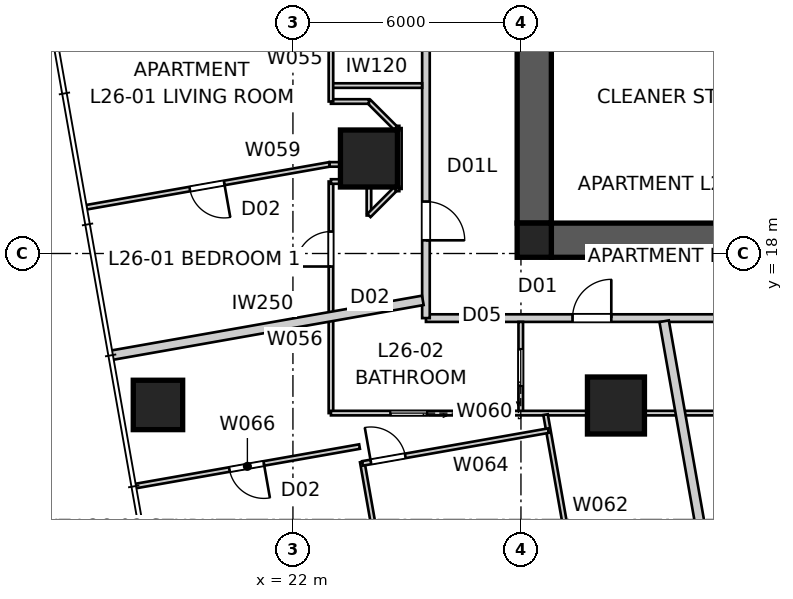
"""IFC4 building model, lengths in metres.
Left out: names, types, materials, properties, quantities, classifications, styles, units other than length and angle.
Written with IfcOpenShell. Run it as: python <this file> out.ifc"""

import sys

from ifc_helpers import new_model, si_unit, direction, frame, frame_2d, origin, origin_2d, place, context, subcontext, project, spatial, polyline, rectangle, outline, extrude, element, fill, save


model = new_model("IFC4")
c1 = context("Model", 3, precision=1e-05, world=origin(), true_north=direction((0.0, 1.0)))
c2 = subcontext(c1, "Body", "Model", "MODEL_VIEW")
j1 = project(units=[si_unit("LENGTHUNIT", "METRE"), si_unit("PLANEANGLEUNIT", "RADIAN")], contexts=[c1])
p1 = place(None, origin())
s1 = spatial("IfcSite", under=j1, at=p1, CompositionType="ELEMENT")
p2 = place(p1, origin())
s2 = spatial("IfcBuilding", under=s1, at=p2, CompositionType="ELEMENT")
p3 = place(p2, frame((0.0, 0.0, 96.4)))
s3 = spatial("IfcBuildingStorey", under=s2, at=p3, CompositionType="ELEMENT", Elevation=96.4)
p4 = place(p3, frame((51.2, 18.35, 0.0), z_axis=(0.0, 0.0, 1.0), x_axis=(-1.0, 0.0, 0.0)))
e1 = element("IfcWall", 1, at=p4, inside=s3, PredefinedType="SHEAR", context=c2, shape_type="SweptSolid", body=[
    extrude(outline(polyline([(0.0, -0.45), (22.4, -0.45), (22.4, -0.025), (22.85, -0.025), (22.85, 0.025), (22.4, 0.025), (22.4, 0.45), (0.0, 0.45), (0.0, 0.025), (-0.45, 0.025), (-0.45, -0.025), (0.0, -0.025), (0.0, -0.45)])), origin(), (0.0, 0.0, 1.0), 3.4),
])
p5 = place(p3, frame((28.35, 41.2, 0.0), z_axis=(0.0, 0.0, 1.0), x_axis=(0.0, -1.0, 0.0)))
e2 = element("IfcWall", 2, at=p5, inside=s3, PredefinedType="SHEAR", context=c2, shape_type="SweptSolid", body=[
    extrude(outline(polyline([(0.0, -0.45), (22.4, -0.45), (22.4, -0.025), (22.85, -0.025), (22.85, 0.025), (22.4, 0.025), (22.4, 0.45), (0.0, 0.45), (0.0, 0.025), (-0.45, 0.025), (-0.45, -0.025), (0.0, -0.025), (0.0, -0.45)])), origin(), (0.0, 0.0, 1.0), 3.4),
])
p6 = place(p5, frame((11.14, 0.0, 0.0)))
e3 = element("IfcOpeningElement", 3, at=p6, cuts=e2, PredefinedType="OPENING", context=c2, shape_type="SweptSolid", body=[
    extrude(rectangle(XDim=1.02, YDim=2.4, at=frame_2d((0.51, 1.2))), frame((0.0, 0.46, 0.0), z_axis=(0.0, -1.0, 0.0), x_axis=(1.0, 0.0, 0.0)), (0.0, 0.0, 1.0), 0.92),
])
p7 = place(p3, frame((28.35, 18.35, 0.0), z_axis=(0.0, 0.0, 1.0), x_axis=(1.0, 0.0, 0.0)))
e4 = element("IfcColumn", 4, at=p7, inside=s3, PredefinedType="COLUMN", context=c2, shape_type="SweptSolid", body=[
    extrude(rectangle(XDim=0.9, YDim=0.9, at=origin_2d()), origin(), (0.0, 0.0, 1.0), 3.4),
])
p8 = place(p3, frame((18.448, 14.015, 0.0), z_axis=(0.0, 0.0, 1.0), x_axis=(1.0, 0.0, 0.0)))
e5 = element("IfcColumn", 5, at=p8, inside=s3, PredefinedType="COLUMN", context=c2, shape_type="SweptSolid", body=[
    extrude(rectangle(XDim=1.3, YDim=1.3, at=origin_2d()), origin(), (0.0, 0.0, 1.0), 3.4),
])
for number, where, z_axis, x_axis in (
    (6, (24.0, 20.5, 0.0), (0.0, 0.0, 1.0), (1.0, 0.0, 0.0)),
    (7, (30.5, 14.0, 0.0), (0.0, 0.0, 1.0), (1.0, 0.0, 0.0)),
):
    element("IfcColumn", number, at=place(p3, frame(where, z_axis=z_axis, x_axis=x_axis)), inside=s3, PredefinedType="COLUMN", context=c2, shape_type="SweptSolid", body=[
        extrude(rectangle(XDim=1.5, YDim=1.5, at=origin_2d()), origin(), (0.0, 0.0, 1.0), 3.4),
    ])
p9 = place(p3, frame((25.5, 16.3, 0.0), z_axis=(0.0, 0.0, 1.0), x_axis=(1.0, 0.0, 0.0)))
e8 = element("IfcWall", 8, at=p9, inside=s3, PredefinedType="PARTITIONING", context=c2, shape_type="SweptSolid", body=[
    extrude(rectangle(XDim=29.0, YDim=0.2, at=frame_2d((14.5, 0.0))), origin(), (0.0, 0.0, 1.0), 3.25),
])
p10 = place(p9, frame((20.896, 0.0, 0.0)))
e9 = element("IfcOpeningElement", 9, at=p10, cuts=e8, PredefinedType="OPENING", context=c2, shape_type="SweptSolid", body=[
    extrude(rectangle(XDim=1.02, YDim=2.34, at=frame_2d((0.51, 1.17))), frame((0.0, 0.11, 0.0), z_axis=(0.0, -1.0, 0.0), x_axis=(1.0, 0.0, 0.0)), (0.0, 0.0, 1.0), 0.22),
])
p11 = place(p9, frame((14.257, 0.0, 0.0)))
e10 = element("IfcOpeningElement", 10, at=p11, cuts=e8, PredefinedType="OPENING", context=c2, shape_type="SweptSolid", body=[
    extrude(rectangle(XDim=1.02, YDim=2.34, at=frame_2d((0.51, 1.17))), frame((0.0, 0.11, 0.0), z_axis=(0.0, -1.0, 0.0), x_axis=(1.0, 0.0, 0.0)), (0.0, 0.0, 1.0), 0.22),
])
p12 = place(p9, frame((3.857, 0.0, 0.0)))
e11 = element("IfcOpeningElement", 11, at=p12, cuts=e8, PredefinedType="OPENING", context=c2, shape_type="SweptSolid", body=[
    extrude(rectangle(XDim=1.02, YDim=2.34, at=frame_2d((0.51, 1.17))), frame((0.0, 0.11, 0.0), z_axis=(0.0, -1.0, 0.0), x_axis=(1.0, 0.0, 0.0)), (0.0, 0.0, 1.0), 0.22),
])
p13 = place(p3, frame((25.5, 43.7, 0.0), z_axis=(0.0, 0.0, 1.0), x_axis=(0.0, -1.0, 0.0)))
e12 = element("IfcWall", 12, at=p13, inside=s3, PredefinedType="PARTITIONING", context=c2, shape_type="SweptSolid", body=[
    extrude(rectangle(XDim=27.4, YDim=0.2, at=frame_2d((13.7, 0.0))), origin(), (0.0, 0.0, 1.0), 3.25),
])
p14 = place(p13, frame((24.333, 0.0, 0.0)))
e13 = element("IfcOpeningElement", 13, at=p14, cuts=e12, PredefinedType="OPENING", context=c2, shape_type="SweptSolid", body=[
    extrude(rectangle(XDim=1.02, YDim=2.1, at=frame_2d((0.51, 1.05))), frame((0.0, 0.11, 0.0), z_axis=(0.0, -1.0, 0.0), x_axis=(1.0, 0.0, 0.0)), (0.0, 0.0, 1.0), 0.22),
])
p15 = place(p13, frame((10.631, 0.0, 0.0)))
e14 = element("IfcOpeningElement", 14, at=p15, cuts=e12, PredefinedType="OPENING", context=c2, shape_type="SweptSolid", body=[
    extrude(rectangle(XDim=1.02, YDim=2.34, at=frame_2d((0.51, 1.17))), frame((0.0, 0.11, 0.0), z_axis=(0.0, -1.0, 0.0), x_axis=(1.0, 0.0, 0.0)), (0.0, 0.0, 1.0), 0.22),
])
p16 = place(p13, frame((0.911, 0.0, 0.0)))
e15 = element("IfcOpeningElement", 15, at=p16, cuts=e12, PredefinedType="OPENING", context=c2, shape_type="SweptSolid", body=[
    extrude(rectangle(XDim=1.02, YDim=2.34, at=frame_2d((0.51, 1.17))), frame((0.0, 0.11, 0.0), z_axis=(0.0, -1.0, 0.0), x_axis=(1.0, 0.0, 0.0)), (0.0, 0.0, 1.0), 0.22),
])
p17 = place(p3, frame((34.001, 3.556, 0.0), z_axis=(0.0, 0.0, 1.0), x_axis=(-0.173639088111, 0.984809355703, 0.0)))
e16 = element("IfcWall", 16, at=p17, inside=s3, PredefinedType="PARTITIONING", context=c2, shape_type="SweptSolid", body=[
    extrude(rectangle(XDim=12.857, YDim=0.25, at=frame_2d((6.428, 0.0))), origin(), (0.0, 0.0, 1.0), 3.25),
])
p18 = place(p3, frame((17.203, 15.318, 0.0), z_axis=(0.0, 0.0, 1.0), x_axis=(0.984807121942, 0.173651756605, 0.0)))
e17 = element("IfcWall", 17, at=p18, inside=s3, PredefinedType="PARTITIONING", context=c2, shape_type="SweptSolid", body=[
    extrude(rectangle(XDim=8.341, YDim=0.25, at=frame_2d((4.171, 0.0))), origin(), (0.0, 0.0, 1.0), 3.25),
])
p19 = place(p3, frame((23.0, 22.419, 0.0), z_axis=(0.0, 0.0, 1.0), x_axis=(1.0, 0.0, 0.0)))
e18 = element("IfcWall", 18, at=p19, inside=s3, PredefinedType="PARTITIONING", context=c2, shape_type="SweptSolid", body=[
    extrude(rectangle(XDim=2.4, YDim=0.12, at=frame_2d((1.2, 0.0))), origin(), (0.0, 0.0, 1.0), 3.25),
])
p20 = place(p3, frame((24.0, 20.344, 0.0), z_axis=(0.0, 0.0, 1.0), x_axis=(0.0, -1.0, 0.0)))
e19 = element("IfcWall", 19, at=p20, inside=s3, PredefinedType="PARTITIONING", context=c2, shape_type="SweptSolid", body=[
    extrude(rectangle(XDim=1.344, YDim=0.12, at=frame_2d((0.672, 0.0))), origin(), (0.0, 0.0, 1.0), 3.25),
])
p21 = place(p3, frame((24.0, 19.0, 0.0), z_axis=(0.0, 0.0, 1.0), x_axis=(0.707106781187, 0.707106781187, 0.0)))
e20 = element("IfcWall", 20, at=p21, inside=s3, PredefinedType="PARTITIONING", context=c2, shape_type="SweptSolid", body=[
    extrude(rectangle(XDim=0.99, YDim=0.12, at=frame_2d((0.495, 0.0))), origin(), (0.0, 0.0, 1.0), 3.25),
])
p22 = place(p3, frame((24.8, 19.7, 0.0), z_axis=(0.0, 0.0, 1.0), x_axis=(0.0, 1.0, 0.0)))
e21 = element("IfcWall", 21, at=p22, inside=s3, PredefinedType="PARTITIONING", context=c2, shape_type="SweptSolid", body=[
    extrude(rectangle(XDim=1.6, YDim=0.12, at=frame_2d((0.8, 0.0))), origin(), (0.0, 0.0, 1.0), 3.25),
])
p23 = place(p3, frame((24.7, 21.3, 0.0), z_axis=(0.0, 0.0, 1.0), x_axis=(-0.707106781187, 0.707106781187, 0.0)))
e22 = element("IfcWall", 22, at=p23, inside=s3, PredefinedType="PARTITIONING", context=c2, shape_type="SweptSolid", body=[
    extrude(rectangle(XDim=0.99, YDim=0.12, at=frame_2d((0.495, 0.0))), origin(), (0.0, 0.0, 1.0), 3.25),
])
p24 = place(p3, frame((24.0, 22.0, 0.0), z_axis=(0.0, 0.0, 1.0), x_axis=(-1.0, 0.0, 0.0)))
e23 = element("IfcWall", 23, at=p24, inside=s3, PredefinedType="PARTITIONING", context=c2, shape_type="SweptSolid", body=[
    extrude(rectangle(XDim=1.0, YDim=0.12, at=frame_2d((0.5, 0.0))), origin(), (0.0, 0.0, 1.0), 2.722),
])
p25 = place(p3, frame((23.0, 22.0, 0.0), z_axis=(0.0, 0.0, 1.0), x_axis=(0.0, 1.0, 0.0)))
e24 = element("IfcWall", 24, at=p25, inside=s3, PredefinedType="PARTITIONING", context=c2, shape_type="SweptSolid", body=[
    extrude(rectangle(XDim=15.664, YDim=0.12, at=frame_2d((7.832, 0.0))), origin(), (0.0, 0.0, 1.0), 2.55),
])
p26 = place(p25, frame((9.874, 0.0, 0.0)))
e25 = element("IfcOpeningElement", 25, at=p26, cuts=e24, PredefinedType="OPENING", context=c2, shape_type="SweptSolid", body=[
    extrude(rectangle(XDim=0.92, YDim=2.34, at=frame_2d((0.46, 1.17))), frame((0.0, 0.07, 0.0), z_axis=(0.0, -1.0, 0.0), x_axis=(1.0, 0.0, 0.0)), (0.0, 0.0, 1.0), 0.14),
])
p27 = place(p25, frame((13.734, 0.0, 0.0)))
e26 = element("IfcOpeningElement", 26, at=p27, cuts=e24, PredefinedType="OPENING", context=c2, shape_type="SweptSolid", body=[
    extrude(rectangle(XDim=0.96, YDim=2.1, at=frame_2d((0.48, 1.05))), frame((0.0, 0.07, 0.0), z_axis=(0.0, -1.0, 0.0), x_axis=(1.0, 0.0, 0.0)), (0.0, 0.0, 1.0), 0.14),
])
p28 = place(p25, frame((6.198, 0.0, 0.0)))
e27 = element("IfcOpeningElement", 27, at=p28, cuts=e24, PredefinedType="OPENING", context=c2, shape_type="SweptSolid", body=[
    extrude(rectangle(XDim=0.96, YDim=2.1, at=frame_2d((0.48, 1.05))), frame((0.0, 0.07, 0.0), z_axis=(0.0, -1.0, 0.0), x_axis=(1.0, 0.0, 0.0)), (0.0, 0.0, 1.0), 0.14),
])
p29 = place(p25, frame((2.231, 0.0, 0.0)))
e28 = element("IfcOpeningElement", 28, at=p29, cuts=e24, PredefinedType="OPENING", context=c2, shape_type="SweptSolid", body=[
    extrude(rectangle(XDim=0.96, YDim=2.1, at=frame_2d((0.48, 1.05))), frame((0.0, 0.07, 0.0), z_axis=(0.0, -1.0, 0.0), x_axis=(1.0, 0.0, 0.0)), (0.0, 0.0, 1.0), 0.14),
])
p30 = place(p3, frame((23.0, 13.8, 0.0), z_axis=(0.0, 0.0, 1.0), x_axis=(0.0, 1.0, 0.0)))
e29 = element("IfcWall", 29, at=p30, inside=s3, PredefinedType="PARTITIONING", context=c2, shape_type="SweptSolid", body=[
    extrude(rectangle(XDim=6.094, YDim=0.12, at=frame_2d((3.047, 0.0))), origin(), (0.0, 0.0, 1.0), 3.25),
])
p31 = place(p30, frame((3.857, 0.0, 0.0)))
e30 = element("IfcOpeningElement", 30, at=p31, cuts=e29, PredefinedType="OPENING", context=c2, shape_type="SweptSolid", body=[
    extrude(rectangle(XDim=0.92, YDim=2.34, at=frame_2d((0.46, 1.17))), frame((0.0, 0.07, 0.0), z_axis=(0.0, -1.0, 0.0), x_axis=(1.0, 0.0, 0.0)), (0.0, 0.0, 1.0), 0.14),
])
p32 = place(p3, frame((23.0, 19.894, 0.0), z_axis=(0.0, 0.0, 1.0), x_axis=(1.0, 0.0, 0.0)))
e31 = element("IfcWall", 31, at=p32, inside=s3, PredefinedType="PARTITIONING", context=c2, shape_type="SweptSolid", body=[
    extrude(rectangle(XDim=1.0, YDim=0.12, at=frame_2d((0.5, 0.0))), origin(), (0.0, 0.0, 1.0), 3.25),
])
p33 = place(p3, frame((24.0, 20.344, 0.0), z_axis=(0.0, 0.0, 1.0), x_axis=(-1.0, 0.0, 0.0)))
e32 = element("IfcWall", 32, at=p33, inside=s3, PredefinedType="PARTITIONING", context=c2, shape_type="SweptSolid", body=[
    extrude(rectangle(XDim=1.039, YDim=0.12, at=frame_2d((0.52, 0.0))), origin(), (0.0, 0.0, 1.0), 3.25),
])
p34 = place(p3, frame((22.961, 20.344, 0.0), z_axis=(0.0, 0.0, 1.0), x_axis=(-0.984809249117, -0.173639692622, 0.0)))
e33 = element("IfcWall", 33, at=p34, inside=s3, PredefinedType="PARTITIONING", context=c2, shape_type="SweptSolid", body=[
    extrude(rectangle(XDim=6.503, YDim=0.12, at=frame_2d((3.251, 0.0))), origin(), (0.0, 0.0, 1.0), 3.25),
])
p35 = place(p34, frame((2.811, 0.0, 0.0)))
e34 = element("IfcOpeningElement", 34, at=p35, cuts=e33, PredefinedType="OPENING", context=c2, shape_type="SweptSolid", body=[
    extrude(rectangle(XDim=0.92, YDim=2.34, at=frame_2d((0.46, 1.17))), frame((0.0, 0.07, 0.0), z_axis=(0.0, -1.0, 0.0), x_axis=(1.0, 0.0, 0.0)), (0.0, 0.0, 1.0), 0.14),
])
p36 = place(p3, frame((27.995, 13.8, 0.0), z_axis=(0.0, 0.0, 1.0), x_axis=(0.0, 1.0, 0.0)))
e35 = element("IfcWall", 35, at=p36, inside=s3, PredefinedType="PARTITIONING", context=c2, shape_type="SweptSolid", body=[
    extrude(rectangle(XDim=2.4, YDim=0.12, at=frame_2d((1.2, 0.0))), origin(), (0.0, 0.0, 1.0), 3.25),
])
p37 = place(p36, frame((0.72, 0.0, 0.0)))
e36 = element("IfcOpeningElement", 36, at=p37, cuts=e35, PredefinedType="OPENING", context=c2, shape_type="SweptSolid", body=[
    extrude(rectangle(XDim=0.96, YDim=2.1, at=frame_2d((0.48, 1.05))), frame((0.0, 0.07, 0.0), z_axis=(0.0, -1.0, 0.0), x_axis=(1.0, 0.0, 0.0)), (0.0, 0.0, 1.0), 0.14),
])
p38 = place(p3, frame((57.0, 13.8, 0.0), z_axis=(0.0, 0.0, 1.0), x_axis=(-1.0, 0.0, 0.0)))
e37 = element("IfcWall", 37, at=p38, inside=s3, PredefinedType="PARTITIONING", context=c2, shape_type="SweptSolid", body=[
    extrude(rectangle(XDim=34.0, YDim=0.12, at=frame_2d((17.0, 0.0))), origin(), (0.0, 0.0, 1.0), 2.55),
])
p39 = place(p38, frame((8.768, 0.0, 0.0)))
e38 = element("IfcOpeningElement", 38, at=p39, cuts=e37, PredefinedType="OPENING", context=c2, shape_type="SweptSolid", body=[
    extrude(rectangle(XDim=0.92, YDim=2.34, at=frame_2d((0.46, 1.17))), frame((0.0, 0.07, 0.0), z_axis=(0.0, -1.0, 0.0), x_axis=(1.0, 0.0, 0.0)), (0.0, 0.0, 1.0), 0.14),
])
p40 = place(p38, frame((10.995, 0.0, 0.0)))
e39 = element("IfcOpeningElement", 39, at=p40, cuts=e37, PredefinedType="OPENING", context=c2, shape_type="SweptSolid", body=[
    extrude(rectangle(XDim=0.92, YDim=2.34, at=frame_2d((0.46, 1.17))), frame((0.0, 0.07, 0.0), z_axis=(0.0, -1.0, 0.0), x_axis=(1.0, 0.0, 0.0)), (0.0, 0.0, 1.0), 0.14),
])
p41 = place(p38, frame((15.486, 0.0, 0.0)))
e40 = element("IfcOpeningElement", 40, at=p41, cuts=e37, PredefinedType="OPENING", context=c2, shape_type="SweptSolid", body=[
    extrude(rectangle(XDim=0.92, YDim=2.34, at=frame_2d((0.46, 1.17))), frame((0.0, 0.07, 0.0), z_axis=(0.0, -1.0, 0.0), x_axis=(1.0, 0.0, 0.0)), (0.0, 0.0, 1.0), 0.14),
])
p42 = place(p38, frame((4.804, 0.0, 0.0)))
e41 = element("IfcOpeningElement", 41, at=p42, cuts=e37, PredefinedType="OPENING", context=c2, shape_type="SweptSolid", body=[
    extrude(rectangle(XDim=0.96, YDim=2.1, at=frame_2d((0.48, 1.05))), frame((0.0, 0.07, 0.0), z_axis=(0.0, -1.0, 0.0), x_axis=(1.0, 0.0, 0.0)), (0.0, 0.0, 1.0), 0.14),
])
p43 = place(p38, frame((19.155, 0.0, 0.0)))
e42 = element("IfcOpeningElement", 42, at=p43, cuts=e37, PredefinedType="OPENING", context=c2, shape_type="SweptSolid", body=[
    extrude(rectangle(XDim=0.96, YDim=2.1, at=frame_2d((0.48, 1.05))), frame((0.0, 0.07, 0.0), z_axis=(0.0, -1.0, 0.0), x_axis=(1.0, 0.0, 0.0)), (0.0, 0.0, 1.0), 0.14),
])
p44 = place(p38, frame((31.473, 0.0, 0.0)))
e43 = element("IfcOpeningElement", 43, at=p44, cuts=e37, PredefinedType="OPENING", context=c2, shape_type="SweptSolid", body=[
    extrude(rectangle(XDim=0.96, YDim=2.1, at=frame_2d((0.48, 1.05))), frame((0.0, 0.07, 0.0), z_axis=(0.0, -1.0, 0.0), x_axis=(1.0, 0.0, 0.0)), (0.0, 0.0, 1.0), 0.14),
])
p45 = place(p38, frame((1.261, 0.0, 0.0)))
e44 = element("IfcOpeningElement", 44, at=p45, cuts=e37, PredefinedType="OPENING", context=c2, shape_type="SweptSolid", body=[
    extrude(rectangle(XDim=0.96, YDim=2.1, at=frame_2d((0.48, 1.05))), frame((0.0, 0.07, 0.0), z_axis=(0.0, -1.0, 0.0), x_axis=(1.0, 0.0, 0.0)), (0.0, 0.0, 1.0), 0.14),
])
p46 = place(p38, frame((22.627, 0.0, 0.0)))
e45 = element("IfcOpeningElement", 45, at=p46, cuts=e37, PredefinedType="OPENING", context=c2, shape_type="SweptSolid", body=[
    extrude(rectangle(XDim=0.96, YDim=2.1, at=frame_2d((0.48, 1.05))), frame((0.0, 0.07, 0.0), z_axis=(0.0, -1.0, 0.0), x_axis=(1.0, 0.0, 0.0)), (0.0, 0.0, 1.0), 0.14),
])
p47 = place(p3, frame((28.648, 13.76, 0.0), z_axis=(0.0, 0.0, 1.0), x_axis=(0.173632532564, -0.984810511538, 0.0)))
e46 = element("IfcWall", 46, at=p47, inside=s3, PredefinedType="PARTITIONING", context=c2, shape_type="SweptSolid", body=[
    extrude(rectangle(XDim=10.938, YDim=0.12, at=frame_2d((5.469, 0.0))), origin(), (0.0, 0.0, 1.0), 2.638),
])
p48 = place(p47, frame((5.243, 0.0, 0.0)))
e47 = element("IfcOpeningElement", 47, at=p48, cuts=e46, PredefinedType="OPENING", context=c2, shape_type="SweptSolid", body=[
    extrude(rectangle(XDim=0.92, YDim=2.34, at=frame_2d((0.46, 1.17))), frame((0.0, 0.07, 0.0), z_axis=(0.0, -1.0, 0.0), x_axis=(1.0, 0.0, 0.0)), (0.0, 0.0, 1.0), 0.14),
])
p49 = place(p3, frame((25.656, 2.126, 0.0), z_axis=(0.0, 0.0, 1.0), x_axis=(-0.173653317458, 0.984806846715, 0.0)))
e48 = element("IfcWall", 48, at=p49, inside=s3, PredefinedType="PARTITIONING", context=c2, shape_type="SweptSolid", body=[
    extrude(rectangle(XDim=10.55, YDim=0.12, at=frame_2d((5.275, 0.0))), origin(), (0.0, 0.0, 1.0), 3.25),
])
p50 = place(p3, frame((23.831, 12.476, 0.0), z_axis=(0.0, 0.0, 1.0), x_axis=(0.984810765884, 0.173631089957, 0.0)))
e49 = element("IfcWall", 49, at=p50, inside=s3, PredefinedType="PARTITIONING", context=c2, shape_type="SweptSolid", body=[
    extrude(rectangle(XDim=4.966, YDim=0.12, at=frame_2d((2.483, 0.0))), origin(), (0.0, 0.0, 1.0), 3.25),
])
p51 = place(p50, frame((0.223, 0.0, 0.0)))
e50 = element("IfcOpeningElement", 50, at=p51, cuts=e49, PredefinedType="OPENING", context=c2, shape_type="SweptSolid", body=[
    extrude(rectangle(XDim=0.92, YDim=2.34, at=frame_2d((0.46, 1.17))), frame((0.0, 0.07, 0.0), z_axis=(0.0, -1.0, 0.0), x_axis=(1.0, 0.0, 0.0)), (0.0, 0.0, 1.0), 0.14),
])
p52 = place(p3, frame((23.753, 12.919, 0.0), z_axis=(0.0, 0.0, 1.0), x_axis=(-0.984806924634, -0.173652875567, 0.0)))
e51 = element("IfcWall", 51, at=p52, inside=s3, PredefinedType="PARTITIONING", context=c2, shape_type="SweptSolid", body=[
    extrude(rectangle(XDim=5.993, YDim=0.12, at=frame_2d((2.997, 0.0))), origin(), (0.0, 0.0, 1.0), 2.638),
])
p53 = place(p52, frame((2.557, 0.0, 0.0)))
e52 = element("IfcOpeningElement", 52, at=p53, cuts=e51, PredefinedType="OPENING", context=c2, shape_type="SweptSolid", body=[
    extrude(rectangle(XDim=0.92, YDim=2.34, at=frame_2d((0.46, 1.17))), frame((0.0, 0.07, 0.0), z_axis=(0.0, -1.0, 0.0), x_axis=(1.0, 0.0, 0.0)), (0.0, 0.0, 1.0), 0.14),
])
for number, where, z_axis, x_axis in (
    (53, (24.8, 19.7, 0.0), (0.0, 0.0, 1.0), (-1.0, 0.0, 0.0)),
    (54, (24.8, 21.3, 0.0), (0.0, 0.0, 1.0), (-1.0, 0.0, 0.0)),
):
    element("IfcWall", number, at=place(p3, frame(where, z_axis=z_axis, x_axis=x_axis)), inside=s3, PredefinedType="PARTITIONING", context=c2, shape_type="SweptSolid", body=[
        extrude(rectangle(XDim=0.1, YDim=0.12, at=frame_2d((0.05, 0.0))), origin(), (0.0, 0.0, 1.0), 3.25),
    ])
p54 = place(p14, origin())
e55 = element("IfcDoor", 55, at=p54, inside=s3, OperationType="SINGLE_SWING_RIGHT", PredefinedType="DOOR", context=c2, shape_type="SweptSolid", body=[
    extrude(rectangle(XDim=1.02, YDim=2.1, at=frame_2d((0.51, 1.05))), frame((0.0, 0.025, 0.0), z_axis=(0.0, -1.0, 0.0), x_axis=(1.0, 0.0, 0.0)), (0.0, 0.0, 1.0), 0.05),
])
fill(e13, e55)
p55 = place(p12, origin())
e56 = element("IfcDoor", 56, at=p55, inside=s3, OperationType="SINGLE_SWING_RIGHT", PredefinedType="DOOR", context=c2, shape_type="SweptSolid", body=[
    extrude(rectangle(XDim=1.02, YDim=2.34, at=frame_2d((0.51, 1.17))), frame((0.0, 0.025, 0.0), z_axis=(0.0, -1.0, 0.0), x_axis=(1.0, 0.0, 0.0)), (0.0, 0.0, 1.0), 0.05),
])
fill(e11, e56)
p56 = place(p31, origin())
e57 = element("IfcDoor", 57, at=p56, inside=s3, OperationType="SINGLE_SWING_LEFT", PredefinedType="DOOR", context=c2, shape_type="SweptSolid", body=[
    extrude(rectangle(XDim=0.92, YDim=2.34, at=frame_2d((0.46, 1.17))), frame((0.0, 0.025, 0.0), z_axis=(0.0, -1.0, 0.0), x_axis=(1.0, 0.0, 0.0)), (0.0, 0.0, 1.0), 0.05),
])
fill(e30, e57)
p57 = place(p37, origin())
e58 = element("IfcDoor", 58, at=p57, inside=s3, OperationType="SLIDING_TO_LEFT", PredefinedType="DOOR", context=c2, shape_type="SweptSolid", body=[
    extrude(rectangle(XDim=0.96, YDim=2.1, at=frame_2d((0.48, 1.05))), frame((0.0, 0.025, 0.0), z_axis=(0.0, -1.0, 0.0), x_axis=(1.0, 0.0, 0.0)), (0.0, 0.0, 1.0), 0.05),
])
fill(e36, e58)
p58 = place(p44, origin())
e59 = element("IfcDoor", 59, at=p58, inside=s3, OperationType="SLIDING_TO_LEFT", PredefinedType="DOOR", context=c2, shape_type="SweptSolid", body=[
    extrude(rectangle(XDim=0.96, YDim=2.1, at=frame_2d((0.48, 1.05))), frame((0.0, 0.025, 0.0), z_axis=(0.0, -1.0, 0.0), x_axis=(1.0, 0.0, 0.0)), (0.0, 0.0, 1.0), 0.05),
])
fill(e43, e59)
p59 = place(p53, origin())
e60 = element("IfcDoor", 60, at=p59, inside=s3, OperationType="SINGLE_SWING_LEFT", PredefinedType="DOOR", context=c2, shape_type="SweptSolid", body=[
    extrude(rectangle(XDim=0.92, YDim=2.34, at=frame_2d((0.46, 1.17))), frame((0.0, 0.025, 0.0), z_axis=(0.0, -1.0, 0.0), x_axis=(1.0, 0.0, 0.0)), (0.0, 0.0, 1.0), 0.05),
])
fill(e52, e60)
p60 = place(p51, origin())
e61 = element("IfcDoor", 61, at=p60, inside=s3, OperationType="SINGLE_SWING_LEFT", PredefinedType="DOOR", context=c2, shape_type="SweptSolid", body=[
    extrude(rectangle(XDim=0.92, YDim=2.34, at=frame_2d((0.46, 1.17))), frame((0.0, 0.025, 0.0), z_axis=(0.0, -1.0, 0.0), x_axis=(1.0, 0.0, 0.0)), (0.0, 0.0, 1.0), 0.05),
])
fill(e50, e61)
p61 = place(p35, origin())
e62 = element("IfcDoor", 62, at=p61, inside=s3, OperationType="SINGLE_SWING_LEFT", PredefinedType="DOOR", context=c2, shape_type="SweptSolid", body=[
    extrude(rectangle(XDim=0.92, YDim=2.34, at=frame_2d((0.46, 1.17))), frame((0.0, 0.025, 0.0), z_axis=(0.0, -1.0, 0.0), x_axis=(1.0, 0.0, 0.0)), (0.0, 0.0, 1.0), 0.05),
])
fill(e34, e62)
save(model, sys.argv[1])
